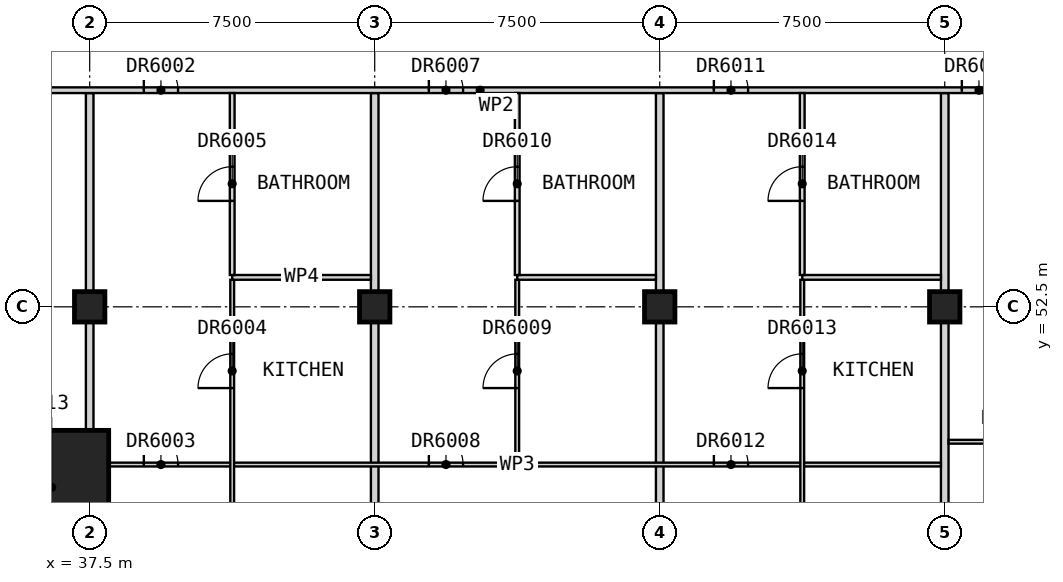
"""IFC4 building model, lengths in metres.
Left out: names, types, materials, properties, quantities, classifications, styles, units other than length and angle.
Written with IfcOpenShell. Run it as: python <this file> out.ifc"""

import sys

from ifc_helpers import new_model, si_unit, direction, frame, frame_2d, origin, origin_2d, place, context, subcontext, project, spatial, rectangle, extrude, element, fill, save


model = new_model("IFC4")
c1 = context("Model", 3, precision=1e-05, world=origin(), true_north=direction((0.0, 1.0)))
c2 = subcontext(c1, "Body", "Model", "MODEL_VIEW")
j1 = project(units=[si_unit("LENGTHUNIT", "METRE"), si_unit("PLANEANGLEUNIT", "RADIAN")], contexts=[c1])
p1 = place(None, origin())
s1 = spatial("IfcSite", under=j1, at=p1, CompositionType="ELEMENT")
p2 = place(p1, origin())
s2 = spatial("IfcBuilding", under=s1, at=p2, CompositionType="ELEMENT")
p3 = place(p2, frame((0.0, 0.0, 226.7)))
s3 = spatial("IfcBuildingStorey", under=s2, at=p3, CompositionType="ELEMENT", Elevation=226.7)
for number, where, z_axis, x_axis in (
    (1, (37.5, 52.5, 0.0), (0.0, 0.0, 1.0), (1.0, 0.0, 0.0)),
    (2, (45.0, 52.5, 0.0), (0.0, 0.0, 1.0), (1.0, 0.0, 0.0)),
    (3, (52.5, 52.5, 0.0), (0.0, 0.0, 1.0), (1.0, 0.0, 0.0)),
    (4, (60.0, 52.5, 0.0), (0.0, 0.0, 1.0), (1.0, 0.0, 0.0)),
):
    element("IfcColumn", number, at=place(p3, frame(where, z_axis=z_axis, x_axis=x_axis)), inside=s3, PredefinedType="COLUMN", context=c2, shape_type="SweptSolid", body=[
        extrude(rectangle(XDim=0.8, YDim=0.8, at=origin_2d()), origin(), (0.0, 0.0, 1.0), 3.5),
    ])
p4 = place(p3, frame((36.5, 47.75, 0.0), z_axis=(0.0, 0.0, 1.0), x_axis=(1.0, 0.0, 0.0)))
e5 = element("IfcColumn", 5, at=p4, inside=s3, PredefinedType="COLUMN", context=c2, shape_type="SweptSolid", body=[
    extrude(rectangle(XDim=3.0, YDim=3.0, at=origin_2d()), origin(), (0.0, 0.0, 1.0), 3.5),
])
p5 = place(p3, frame((37.5, 41.25, 0.0), z_axis=(0.0, 0.0, 1.0), x_axis=(0.0, 1.0, 0.0)))
e6 = element("IfcWall", 6, at=p5, inside=s3, PredefinedType="PARTITIONING", context=c2, shape_type="SweptSolid", body=[
    extrude(rectangle(XDim=16.875, YDim=0.2, at=frame_2d((8.438, 0.0))), origin(), (0.0, 0.0, 1.0), 2.75),
])
for number, where, z_axis, x_axis in (
    (7, (45.0, 41.25, 0.0), (0.0, 0.0, 1.0), (0.0, 1.0, 0.0)),
    (8, (52.5, 41.25, 0.0), (0.0, 0.0, 1.0), (0.0, 1.0, 0.0)),
    (9, (60.0, 41.25, 0.0), (0.0, 0.0, 1.0), (0.0, 1.0, 0.0)),
):
    element("IfcWall", number, at=place(p3, frame(where, z_axis=z_axis, x_axis=x_axis)), inside=s3, PredefinedType="PARTITIONING", context=c2, shape_type="SweptSolid", body=[
        extrude(rectangle(XDim=16.875, YDim=0.2, at=frame_2d((8.438, 0.0))), origin(), (0.0, 0.0, 1.0), 3.25),
    ])
p6 = place(p3, frame((33.75, 58.2, 0.0), z_axis=(0.0, 0.0, 1.0), x_axis=(1.0, 0.0, 0.0)))
e10 = element("IfcWall", 10, at=p6, inside=s3, PredefinedType="PARTITIONING", context=c2, shape_type="SweptSolid", body=[
    extrude(rectangle(XDim=28.05, YDim=0.15, at=frame_2d((14.025, 0.0))), origin(), (0.0, 0.0, 1.0), 3.25),
])
p7 = place(p6, frame((1.375, 0.0, 0.0)))
e11 = element("IfcOpeningElement", 11, at=p7, cuts=e10, PredefinedType="OPENING", context=c2, shape_type="SweptSolid", body=[
    extrude(rectangle(XDim=1.0, YDim=2.1, at=frame_2d((0.5, 1.05))), frame((0.0, 0.085, 0.0), z_axis=(0.0, -1.0, 0.0), x_axis=(1.0, 0.0, 0.0)), (0.0, 0.0, 1.0), 0.17),
])
p8 = place(p6, frame((5.175, 0.0, 0.0)))
e12 = element("IfcOpeningElement", 12, at=p8, cuts=e10, PredefinedType="OPENING", context=c2, shape_type="SweptSolid", body=[
    extrude(rectangle(XDim=0.9, YDim=2.1, at=frame_2d((0.45, 1.05))), frame((0.0, 0.085, 0.0), z_axis=(0.0, -1.0, 0.0), x_axis=(1.0, 0.0, 0.0)), (0.0, 0.0, 1.0), 0.17),
])
p9 = place(p6, frame((12.675, 0.0, 0.0)))
e13 = element("IfcOpeningElement", 13, at=p9, cuts=e10, PredefinedType="OPENING", context=c2, shape_type="SweptSolid", body=[
    extrude(rectangle(XDim=0.9, YDim=2.1, at=frame_2d((0.45, 1.05))), frame((0.0, 0.085, 0.0), z_axis=(0.0, -1.0, 0.0), x_axis=(1.0, 0.0, 0.0)), (0.0, 0.0, 1.0), 0.17),
])
p10 = place(p6, frame((20.175, 0.0, 0.0)))
e14 = element("IfcOpeningElement", 14, at=p10, cuts=e10, PredefinedType="OPENING", context=c2, shape_type="SweptSolid", body=[
    extrude(rectangle(XDim=0.9, YDim=2.1, at=frame_2d((0.45, 1.05))), frame((0.0, 0.085, 0.0), z_axis=(0.0, -1.0, 0.0), x_axis=(1.0, 0.0, 0.0)), (0.0, 0.0, 1.0), 0.17),
])
p11 = place(p6, frame((26.7, 0.0, 0.0)))
e15 = element("IfcOpeningElement", 15, at=p11, cuts=e10, PredefinedType="OPENING", context=c2, shape_type="SweptSolid", body=[
    extrude(rectangle(XDim=0.9, YDim=2.1, at=frame_2d((0.45, 1.05))), frame((0.0, 0.085, 0.0), z_axis=(0.0, -1.0, 0.0), x_axis=(1.0, 0.0, 0.0)), (0.0, 0.0, 1.0), 0.17),
])
p12 = place(p3, frame((37.6, 48.35, 0.0), z_axis=(0.0, 0.0, 1.0), x_axis=(1.0, 0.0, 0.0)))
e16 = element("IfcWall", 16, at=p12, inside=s3, PredefinedType="PARTITIONING", context=c2, shape_type="SweptSolid", body=[
    extrude(rectangle(XDim=22.3, YDim=0.1, at=frame_2d((11.15, 0.0))), origin(), (0.0, 0.0, 1.0), 3.25),
])
p13 = place(p12, frame((1.325, 0.0, 0.0)))
e17 = element("IfcOpeningElement", 17, at=p13, cuts=e16, PredefinedType="OPENING", context=c2, shape_type="SweptSolid", body=[
    extrude(rectangle(XDim=0.9, YDim=2.1, at=frame_2d((0.45, 1.05))), frame((0.0, 0.06, 0.0), z_axis=(0.0, -1.0, 0.0), x_axis=(1.0, 0.0, 0.0)), (0.0, 0.0, 1.0), 0.12),
])
p14 = place(p12, frame((8.825, 0.0, 0.0)))
e18 = element("IfcOpeningElement", 18, at=p14, cuts=e16, PredefinedType="OPENING", context=c2, shape_type="SweptSolid", body=[
    extrude(rectangle(XDim=0.9, YDim=2.1, at=frame_2d((0.45, 1.05))), frame((0.0, 0.06, 0.0), z_axis=(0.0, -1.0, 0.0), x_axis=(1.0, 0.0, 0.0)), (0.0, 0.0, 1.0), 0.12),
])
p15 = place(p12, frame((16.325, 0.0, 0.0)))
e19 = element("IfcOpeningElement", 19, at=p15, cuts=e16, PredefinedType="OPENING", context=c2, shape_type="SweptSolid", body=[
    extrude(rectangle(XDim=0.9, YDim=2.1, at=frame_2d((0.45, 1.05))), frame((0.0, 0.06, 0.0), z_axis=(0.0, -1.0, 0.0), x_axis=(1.0, 0.0, 0.0)), (0.0, 0.0, 1.0), 0.12),
])
p16 = place(p3, frame((60.1, 48.95, 0.0), z_axis=(0.0, 0.0, 1.0), x_axis=(1.0, 0.0, 0.0)))
e20 = element("IfcWall", 20, at=p16, inside=s3, PredefinedType="PARTITIONING", context=c2, shape_type="SweptSolid", body=[
    extrude(rectangle(XDim=17.84, YDim=0.1, at=frame_2d((8.92, 0.0))), origin(), (0.0, 0.0, 1.0), 3.25),
])
p17 = place(p16, frame((1.325, 0.0, 0.0)))
e21 = element("IfcOpeningElement", 21, at=p17, cuts=e20, PredefinedType="OPENING", context=c2, shape_type="SweptSolid", body=[
    extrude(rectangle(XDim=0.9, YDim=2.1, at=frame_2d((0.45, 1.05))), frame((0.0, 0.06, 0.0), z_axis=(0.0, -1.0, 0.0), x_axis=(1.0, 0.0, 0.0)), (0.0, 0.0, 1.0), 0.12),
])
p18 = place(p16, frame((8.475, 0.0, 0.0)))
e22 = element("IfcOpeningElement", 22, at=p18, cuts=e20, PredefinedType="OPENING", context=c2, shape_type="SweptSolid", body=[
    extrude(rectangle(XDim=0.9, YDim=2.1, at=frame_2d((0.45, 1.05))), frame((0.0, 0.06, 0.0), z_axis=(0.0, -1.0, 0.0), x_axis=(1.0, 0.0, 0.0)), (0.0, 0.0, 1.0), 0.12),
])
p19 = place(p16, frame((13.725, 0.0, 0.0)))
e23 = element("IfcOpeningElement", 23, at=p19, cuts=e20, PredefinedType="OPENING", context=c2, shape_type="SweptSolid", body=[
    extrude(rectangle(XDim=0.9, YDim=2.1, at=frame_2d((0.45, 1.05))), frame((0.0, 0.06, 0.0), z_axis=(0.0, -1.0, 0.0), x_axis=(1.0, 0.0, 0.0)), (0.0, 0.0, 1.0), 0.12),
])
p20 = place(p16, frame((16.325, 0.0, 0.0)))
e24 = element("IfcOpeningElement", 24, at=p20, cuts=e20, PredefinedType="OPENING", context=c2, shape_type="SweptSolid", body=[
    extrude(rectangle(XDim=0.9, YDim=2.1, at=frame_2d((0.45, 1.05))), frame((0.0, 0.06, 0.0), z_axis=(0.0, -1.0, 0.0), x_axis=(1.0, 0.0, 0.0)), (0.0, 0.0, 1.0), 0.12),
])
p21 = place(p3, frame((41.25, 42.06, 0.0), z_axis=(0.0, 0.0, 1.0), x_axis=(0.0, 1.0, 0.0)))
e25 = element("IfcWall", 25, at=p21, inside=s3, PredefinedType="PARTITIONING", context=c2, shape_type="SweptSolid", body=[
    extrude(rectangle(XDim=11.152, YDim=0.1, at=frame_2d((5.576, 0.0))), origin(), (0.0, 0.0, 1.0), 3.25),
])
p22 = place(p21, frame((8.302, 0.0, 0.0)))
e26 = element("IfcOpeningElement", 26, at=p22, cuts=e25, PredefinedType="OPENING", context=c2, shape_type="SweptSolid", body=[
    extrude(rectangle(XDim=0.9, YDim=2.1, at=frame_2d((0.45, 1.05))), frame((0.0, 0.06, 0.0), z_axis=(0.0, -1.0, 0.0), x_axis=(1.0, 0.0, 0.0)), (0.0, 0.0, 1.0), 0.12),
])
p23 = place(p21, frame((2.29, 0.0, 0.0)))
e27 = element("IfcOpeningElement", 27, at=p23, cuts=e25, PredefinedType="OPENING", context=c2, shape_type="SweptSolid", body=[
    extrude(rectangle(XDim=0.9, YDim=2.1, at=frame_2d((0.45, 1.05))), frame((0.0, 0.06, 0.0), z_axis=(0.0, -1.0, 0.0), x_axis=(1.0, 0.0, 0.0)), (0.0, 0.0, 1.0), 0.12),
])
p24 = place(p3, frame((48.75, 48.4, 0.0), z_axis=(0.0, 0.0, 1.0), x_axis=(0.0, 1.0, 0.0)))
e28 = element("IfcWall", 28, at=p24, inside=s3, PredefinedType="PARTITIONING", context=c2, shape_type="SweptSolid", body=[
    extrude(rectangle(XDim=4.812, YDim=0.1, at=frame_2d((2.406, 0.0))), origin(), (0.0, 0.0, 1.0), 3.25),
])
p25 = place(p24, frame((1.962, 0.0, 0.0)))
e29 = element("IfcOpeningElement", 29, at=p25, cuts=e28, PredefinedType="OPENING", context=c2, shape_type="SweptSolid", body=[
    extrude(rectangle(XDim=0.9, YDim=2.1, at=frame_2d((0.45, 1.05))), frame((0.0, 0.06, 0.0), z_axis=(0.0, -1.0, 0.0), x_axis=(1.0, 0.0, 0.0)), (0.0, 0.0, 1.0), 0.12),
])
p26 = place(p3, frame((56.25, 42.06, 0.0), z_axis=(0.0, 0.0, 1.0), x_axis=(0.0, 1.0, 0.0)))
e30 = element("IfcWall", 30, at=p26, inside=s3, PredefinedType="PARTITIONING", context=c2, shape_type="SweptSolid", body=[
    extrude(rectangle(XDim=11.152, YDim=0.1, at=frame_2d((5.576, 0.0))), origin(), (0.0, 0.0, 1.0), 3.25),
])
p27 = place(p26, frame((8.302, 0.0, 0.0)))
e31 = element("IfcOpeningElement", 31, at=p27, cuts=e30, PredefinedType="OPENING", context=c2, shape_type="SweptSolid", body=[
    extrude(rectangle(XDim=0.9, YDim=2.1, at=frame_2d((0.45, 1.05))), frame((0.0, 0.06, 0.0), z_axis=(0.0, -1.0, 0.0), x_axis=(1.0, 0.0, 0.0)), (0.0, 0.0, 1.0), 0.12),
])
p28 = place(p26, frame((2.29, 0.0, 0.0)))
e32 = element("IfcOpeningElement", 32, at=p28, cuts=e30, PredefinedType="OPENING", context=c2, shape_type="SweptSolid", body=[
    extrude(rectangle(XDim=0.9, YDim=2.1, at=frame_2d((0.45, 1.05))), frame((0.0, 0.06, 0.0), z_axis=(0.0, -1.0, 0.0), x_axis=(1.0, 0.0, 0.0)), (0.0, 0.0, 1.0), 0.12),
])
for number, where, z_axis, x_axis in (
    (33, (41.25, 53.275, 0.0), (0.0, 0.0, 1.0), (1.0, 0.0, 0.0)),
    (34, (48.75, 53.275, 0.0), (0.0, 0.0, 1.0), (1.0, 0.0, 0.0)),
    (35, (56.25, 53.275, 0.0), (0.0, 0.0, 1.0), (1.0, 0.0, 0.0)),
):
    element("IfcWall", number, at=place(p3, frame(where, z_axis=z_axis, x_axis=x_axis)), inside=s3, PredefinedType="PARTITIONING", context=c2, shape_type="SweptSolid", body=[
        extrude(rectangle(XDim=3.65, YDim=0.125, at=frame_2d((1.825, 0.0))), origin(), (0.0, 0.0, 1.0), 3.25),
    ])
p29 = place(p3, frame((41.25, 53.337, 0.0), z_axis=(0.0, 0.0, 1.0), x_axis=(0.0, 1.0, 0.0)))
e36 = element("IfcWall", 36, at=p29, inside=s3, PredefinedType="PARTITIONING", context=c2, shape_type="SweptSolid", body=[
    extrude(rectangle(XDim=4.788, YDim=0.125, at=frame_2d((2.394, 0.0))), origin(), (0.0, 0.0, 1.0), 3.25),
])
p30 = place(p29, frame((1.95, 0.0, 0.0)))
e37 = element("IfcOpeningElement", 37, at=p30, cuts=e36, PredefinedType="OPENING", context=c2, shape_type="SweptSolid", body=[
    extrude(rectangle(XDim=0.9, YDim=2.1, at=frame_2d((0.45, 1.05))), frame((0.0, 0.073, 0.0), z_axis=(0.0, -1.0, 0.0), x_axis=(1.0, 0.0, 0.0)), (0.0, 0.0, 1.0), 0.145),
])
p31 = place(p3, frame((48.75, 53.337, 0.0), z_axis=(0.0, 0.0, 1.0), x_axis=(0.0, 1.0, 0.0)))
e38 = element("IfcWall", 38, at=p31, inside=s3, PredefinedType="PARTITIONING", context=c2, shape_type="SweptSolid", body=[
    extrude(rectangle(XDim=4.788, YDim=0.125, at=frame_2d((2.394, 0.0))), origin(), (0.0, 0.0, 1.0), 3.25),
])
p32 = place(p31, frame((1.95, 0.0, 0.0)))
e39 = element("IfcOpeningElement", 39, at=p32, cuts=e38, PredefinedType="OPENING", context=c2, shape_type="SweptSolid", body=[
    extrude(rectangle(XDim=0.9, YDim=2.1, at=frame_2d((0.45, 1.05))), frame((0.0, 0.073, 0.0), z_axis=(0.0, -1.0, 0.0), x_axis=(1.0, 0.0, 0.0)), (0.0, 0.0, 1.0), 0.145),
])
p33 = place(p3, frame((56.25, 53.337, 0.0), z_axis=(0.0, 0.0, 1.0), x_axis=(0.0, 1.0, 0.0)))
e40 = element("IfcWall", 40, at=p33, inside=s3, PredefinedType="PARTITIONING", context=c2, shape_type="SweptSolid", body=[
    extrude(rectangle(XDim=4.788, YDim=0.125, at=frame_2d((2.394, 0.0))), origin(), (0.0, 0.0, 1.0), 3.25),
])
p34 = place(p33, frame((1.95, 0.0, 0.0)))
e41 = element("IfcOpeningElement", 41, at=p34, cuts=e40, PredefinedType="OPENING", context=c2, shape_type="SweptSolid", body=[
    extrude(rectangle(XDim=0.9, YDim=2.1, at=frame_2d((0.45, 1.05))), frame((0.0, 0.073, 0.0), z_axis=(0.0, -1.0, 0.0), x_axis=(1.0, 0.0, 0.0)), (0.0, 0.0, 1.0), 0.145),
])
p35 = place(p8, origin())
e42 = element("IfcDoor", 42, at=p35, inside=s3, OperationType="SINGLE_SWING_RIGHT", PredefinedType="DOOR", context=c2, shape_type="SweptSolid", body=[
    extrude(rectangle(XDim=0.9, YDim=2.1, at=frame_2d((0.45, 1.05))), frame((0.0, 0.025, 0.0), z_axis=(0.0, -1.0, 0.0), x_axis=(1.0, 0.0, 0.0)), (0.0, 0.0, 1.0), 0.05),
])
fill(e12, e42)
p36 = place(p13, origin())
e43 = element("IfcDoor", 43, at=p36, inside=s3, OperationType="SINGLE_SWING_LEFT", PredefinedType="DOOR", context=c2, shape_type="SweptSolid", body=[
    extrude(rectangle(XDim=0.9, YDim=2.1, at=frame_2d((0.45, 1.05))), frame((0.0, 0.025, 0.0), z_axis=(0.0, -1.0, 0.0), x_axis=(1.0, 0.0, 0.0)), (0.0, 0.0, 1.0), 0.05),
])
fill(e17, e43)
p37 = place(p22, origin())
e44 = element("IfcDoor", 44, at=p37, inside=s3, OperationType="SINGLE_SWING_LEFT", PredefinedType="DOOR", context=c2, shape_type="SweptSolid", body=[
    extrude(rectangle(XDim=0.9, YDim=2.1, at=frame_2d((0.45, 1.05))), frame((0.0, 0.025, 0.0), z_axis=(0.0, -1.0, 0.0), x_axis=(1.0, 0.0, 0.0)), (0.0, 0.0, 1.0), 0.05),
])
fill(e26, e44)
p38 = place(p30, origin())
e45 = element("IfcDoor", 45, at=p38, inside=s3, OperationType="SINGLE_SWING_RIGHT", PredefinedType="DOOR", context=c2, shape_type="SweptSolid", body=[
    extrude(rectangle(XDim=0.9, YDim=2.1, at=frame_2d((0.45, 1.05))), frame((0.0, 0.025, 0.0), z_axis=(0.0, -1.0, 0.0), x_axis=(1.0, 0.0, 0.0)), (0.0, 0.0, 1.0), 0.05),
])
fill(e37, e45)
p39 = place(p9, origin())
e46 = element("IfcDoor", 46, at=p39, inside=s3, OperationType="SINGLE_SWING_RIGHT", PredefinedType="DOOR", context=c2, shape_type="SweptSolid", body=[
    extrude(rectangle(XDim=0.9, YDim=2.1, at=frame_2d((0.45, 1.05))), frame((0.0, 0.025, 0.0), z_axis=(0.0, -1.0, 0.0), x_axis=(1.0, 0.0, 0.0)), (0.0, 0.0, 1.0), 0.05),
])
fill(e13, e46)
p40 = place(p14, origin())
e47 = element("IfcDoor", 47, at=p40, inside=s3, OperationType="SINGLE_SWING_LEFT", PredefinedType="DOOR", context=c2, shape_type="SweptSolid", body=[
    extrude(rectangle(XDim=0.9, YDim=2.1, at=frame_2d((0.45, 1.05))), frame((0.0, 0.025, 0.0), z_axis=(0.0, -1.0, 0.0), x_axis=(1.0, 0.0, 0.0)), (0.0, 0.0, 1.0), 0.05),
])
fill(e18, e47)
p41 = place(p25, origin())
e48 = element("IfcDoor", 48, at=p41, inside=s3, OperationType="SINGLE_SWING_LEFT", PredefinedType="DOOR", context=c2, shape_type="SweptSolid", body=[
    extrude(rectangle(XDim=0.9, YDim=2.1, at=frame_2d((0.45, 1.05))), frame((0.0, 0.025, 0.0), z_axis=(0.0, -1.0, 0.0), x_axis=(1.0, 0.0, 0.0)), (0.0, 0.0, 1.0), 0.05),
])
fill(e29, e48)
p42 = place(p32, origin())
e49 = element("IfcDoor", 49, at=p42, inside=s3, OperationType="SINGLE_SWING_RIGHT", PredefinedType="DOOR", context=c2, shape_type="SweptSolid", body=[
    extrude(rectangle(XDim=0.9, YDim=2.1, at=frame_2d((0.45, 1.05))), frame((0.0, 0.025, 0.0), z_axis=(0.0, -1.0, 0.0), x_axis=(1.0, 0.0, 0.0)), (0.0, 0.0, 1.0), 0.05),
])
fill(e39, e49)
p43 = place(p10, origin())
e50 = element("IfcDoor", 50, at=p43, inside=s3, OperationType="SINGLE_SWING_RIGHT", PredefinedType="DOOR", context=c2, shape_type="SweptSolid", body=[
    extrude(rectangle(XDim=0.9, YDim=2.1, at=frame_2d((0.45, 1.05))), frame((0.0, 0.025, 0.0), z_axis=(0.0, -1.0, 0.0), x_axis=(1.0, 0.0, 0.0)), (0.0, 0.0, 1.0), 0.05),
])
fill(e14, e50)
p44 = place(p15, origin())
e51 = element("IfcDoor", 51, at=p44, inside=s3, OperationType="SINGLE_SWING_LEFT", PredefinedType="DOOR", context=c2, shape_type="SweptSolid", body=[
    extrude(rectangle(XDim=0.9, YDim=2.1, at=frame_2d((0.45, 1.05))), frame((0.0, 0.025, 0.0), z_axis=(0.0, -1.0, 0.0), x_axis=(1.0, 0.0, 0.0)), (0.0, 0.0, 1.0), 0.05),
])
fill(e19, e51)
p45 = place(p27, origin())
e52 = element("IfcDoor", 52, at=p45, inside=s3, OperationType="SINGLE_SWING_LEFT", PredefinedType="DOOR", context=c2, shape_type="SweptSolid", body=[
    extrude(rectangle(XDim=0.9, YDim=2.1, at=frame_2d((0.45, 1.05))), frame((0.0, 0.025, 0.0), z_axis=(0.0, -1.0, 0.0), x_axis=(1.0, 0.0, 0.0)), (0.0, 0.0, 1.0), 0.05),
])
fill(e31, e52)
p46 = place(p34, origin())
e53 = element("IfcDoor", 53, at=p46, inside=s3, OperationType="SINGLE_SWING_RIGHT", PredefinedType="DOOR", context=c2, shape_type="SweptSolid", body=[
    extrude(rectangle(XDim=0.9, YDim=2.1, at=frame_2d((0.45, 1.05))), frame((0.0, 0.025, 0.0), z_axis=(0.0, -1.0, 0.0), x_axis=(1.0, 0.0, 0.0)), (0.0, 0.0, 1.0), 0.05),
])
fill(e41, e53)
p47 = place(p11, origin())
e54 = element("IfcDoor", 54, at=p47, inside=s3, OperationType="SINGLE_SWING_RIGHT", PredefinedType="DOOR", context=c2, shape_type="SweptSolid", body=[
    extrude(rectangle(XDim=0.9, YDim=2.1, at=frame_2d((0.45, 1.05))), frame((0.0, 0.025, 0.0), z_axis=(0.0, -1.0, 0.0), x_axis=(1.0, 0.0, 0.0)), (0.0, 0.0, 1.0), 0.05),
])
fill(e15, e54)
save(model, sys.argv[1])
